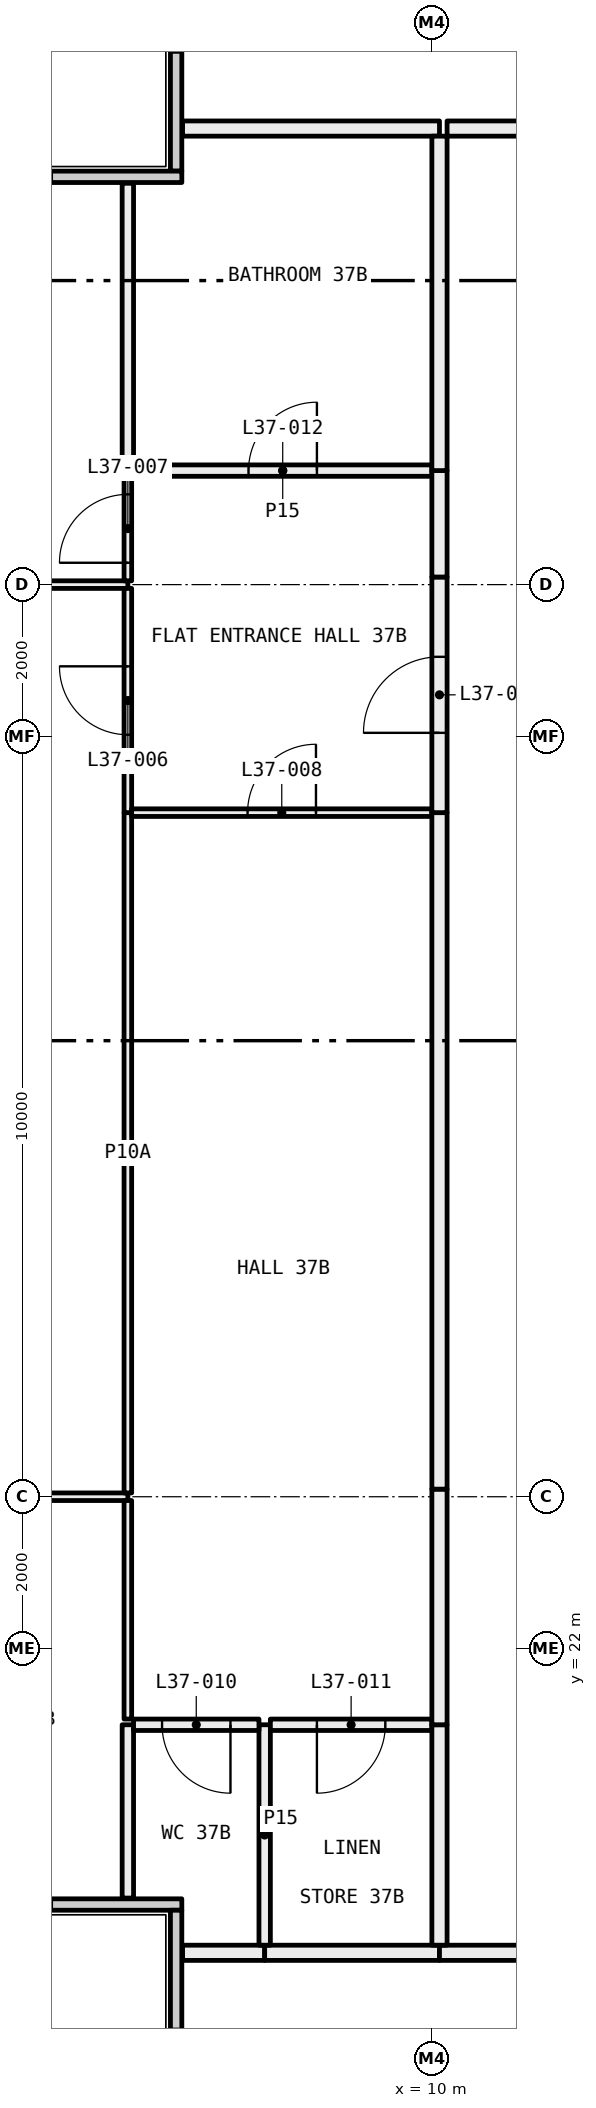
"""IFC4 building model, lengths in metres.
Left out: names, types, materials, properties, quantities, classifications, styles, units other than length and angle.
Written with IfcOpenShell. Run it as: python <this file> out.ifc"""

import sys

from ifc_helpers import new_model, si_unit, direction, frame, frame_2d, origin, place, context, subcontext, project, spatial, rectangle, extrude, element, fill, save


model = new_model("IFC4")
c1 = context("Model", 3, precision=1e-05, world=origin(), true_north=direction((0.0, 1.0)))
c2 = subcontext(c1, "Body", "Model", "MODEL_VIEW")
j1 = project(units=[si_unit("LENGTHUNIT", "METRE"), si_unit("PLANEANGLEUNIT", "RADIAN")], contexts=[c1])
p1 = place(None, origin())
s1 = spatial("IfcSite", under=j1, at=p1, CompositionType="ELEMENT")
p2 = place(p1, origin())
s2 = spatial("IfcBuilding", under=s1, at=p2, CompositionType="ELEMENT")
p3 = place(p2, frame((0.0, 0.0, 141.45)))
s3 = spatial("IfcBuildingStorey", under=s2, at=p3, CompositionType="ELEMENT", Elevation=141.45)
p4 = place(p3, frame((6.635, 41.44, 0.0), z_axis=(0.0, 0.0, 1.0), x_axis=(0.0, 1.0, 0.0)))
e1 = element("IfcWall", 1, at=p4, inside=s3, PredefinedType="ELEMENTEDWALL", context=c2, shape_type="SweptSolid", body=[
    extrude(rectangle(XDim=5.85, YDim=0.15, at=frame_2d((2.925, 0.0))), origin(), (0.0, 0.0, 1.0), 3.05),
])
p5 = place(p4, frame((1.56, 0.0, 0.45)))
e2 = element("IfcOpeningElement", 2, at=p5, cuts=e1, PredefinedType="OPENING", context=c2, shape_type="SweptSolid", body=[
    extrude(rectangle(XDim=4.0, YDim=2.55, at=frame_2d((2.0, 1.275))), frame((0.0, 0.085, 0.0), z_axis=(0.0, -1.0, 0.0), x_axis=(1.0, 0.0, 0.0)), (0.0, 0.0, 1.0), 0.17),
])
p6 = place(p3, frame((0.56, 41.365, 0.0), z_axis=(0.0, 0.0, 1.0), x_axis=(1.0, 0.0, 0.0)))
e3 = element("IfcWall", 3, at=p6, inside=s3, PredefinedType="ELEMENTEDWALL", context=c2, shape_type="SweptSolid", body=[
    extrude(rectangle(XDim=6.15, YDim=0.15, at=frame_2d((3.075, 0.0))), origin(), (0.0, 0.0, 1.0), 3.05),
])
p7 = place(p6, frame((0.44, 0.0, 0.45)))
e4 = element("IfcOpeningElement", 4, at=p7, cuts=e3, PredefinedType="OPENING", context=c2, shape_type="SweptSolid", body=[
    extrude(rectangle(XDim=4.0, YDim=2.55, at=frame_2d((2.0, 1.275))), frame((0.0, 0.085, 0.0), z_axis=(0.0, -1.0, 0.0), x_axis=(1.0, 0.0, 0.0)), (0.0, 0.0, 1.0), 0.17),
])
p8 = place(p3, frame((0.56, 18.635, 0.0), z_axis=(0.0, 0.0, 1.0), x_axis=(1.0, 0.0, 0.0)))
e5 = element("IfcWall", 5, at=p8, inside=s3, PredefinedType="ELEMENTEDWALL", context=c2, shape_type="SweptSolid", body=[
    extrude(rectangle(XDim=6.15, YDim=0.15, at=frame_2d((3.075, 0.0))), origin(), (0.0, 0.0, 1.0), 3.05),
])
p9 = place(p8, frame((0.44, 0.0, 0.45)))
e6 = element("IfcOpeningElement", 6, at=p9, cuts=e5, PredefinedType="OPENING", context=c2, shape_type="SweptSolid", body=[
    extrude(rectangle(XDim=4.0, YDim=2.55, at=frame_2d((2.0, 1.275))), frame((0.0, 0.085, 0.0), z_axis=(0.0, -1.0, 0.0), x_axis=(1.0, 0.0, 0.0)), (0.0, 0.0, 1.0), 0.17),
])
p10 = place(p3, frame((6.635, 12.71, 0.0), z_axis=(0.0, 0.0, 1.0), x_axis=(0.0, 1.0, 0.0)))
e7 = element("IfcWall", 7, at=p10, inside=s3, PredefinedType="ELEMENTEDWALL", context=c2, shape_type="SweptSolid", body=[
    extrude(rectangle(XDim=5.85, YDim=0.15, at=frame_2d((2.925, 0.0))), origin(), (0.0, 0.0, 1.0), 3.05),
])
p11 = place(p10, frame((0.29, 0.0, 0.45)))
e8 = element("IfcOpeningElement", 8, at=p11, cuts=e7, PredefinedType="OPENING", context=c2, shape_type="SweptSolid", body=[
    extrude(rectangle(XDim=4.0, YDim=2.55, at=frame_2d((2.0, 1.275))), frame((0.0, 0.085, 0.0), z_axis=(0.0, -1.0, 0.0), x_axis=(1.0, 0.0, 0.0)), (0.0, 0.0, 1.0), 0.17),
])
p12 = place(p3, frame((7.8, 18.0, 0.0), z_axis=(0.0, 0.0, 1.0), x_axis=(-1.0, 0.0, 0.0)))
e9 = element("IfcWall", 9, at=p12, inside=s3, PredefinedType="PARTITIONING", context=c2, shape_type="SweptSolid", body=[
    extrude(rectangle(XDim=1.08, YDim=0.2, at=frame_2d((0.54, 0.0))), origin(), (0.0, 0.0, 1.0), 3.05),
])
p13 = place(p3, frame((10.1, 18.0, 0.0), z_axis=(0.0, 0.0, 1.0), x_axis=(-1.0, 0.0, 0.0)))
e10 = element("IfcWall", 10, at=p13, inside=s3, PredefinedType="PARTITIONING", context=c2, shape_type="SweptSolid", body=[
    extrude(rectangle(XDim=2.3, YDim=0.2, at=frame_2d((1.15, 0.0))), origin(), (0.0, 0.0, 1.0), 3.05),
])
p14 = place(p3, frame((12.0, 18.0, 0.0), z_axis=(0.0, 0.0, 1.0), x_axis=(-1.0, 0.0, 0.0)))
e11 = element("IfcWall", 11, at=p14, inside=s3, PredefinedType="PARTITIONING", context=c2, shape_type="SweptSolid", body=[
    extrude(rectangle(XDim=1.9, YDim=0.2, at=frame_2d((0.95, 0.0))), origin(), (0.0, 0.0, 1.0), 3.05),
])
p15 = place(p3, frame((6.0, 24.0, 0.0), z_axis=(0.0, 0.0, 1.0), x_axis=(-1.0, 0.0, 0.0)))
e12 = element("IfcWall", 12, at=p15, inside=s3, PredefinedType="PARTITIONING", context=c2, shape_type="SweptSolid", body=[
    extrude(rectangle(XDim=5.28, YDim=0.1, at=frame_2d((2.64, 0.0))), origin(), (0.0, 0.0, 1.0), 2.45),
])
p16 = place(p15, frame((2.19, 0.0, 0.0)))
e13 = element("IfcOpeningElement", 13, at=p16, cuts=e12, PredefinedType="OPENING", context=c2, shape_type="SweptSolid", body=[
    extrude(rectangle(XDim=0.9, YDim=2.1, at=frame_2d((0.45, 1.05))), frame((0.0, 0.06, 0.0), z_axis=(0.0, -1.0, 0.0), x_axis=(1.0, 0.0, 0.0)), (0.0, 0.0, 1.0), 0.12),
])
p17 = place(p3, frame((6.0, 18.72, 0.0), z_axis=(0.0, 0.0, 1.0), x_axis=(0.0, 1.0, 0.0)))
e14 = element("IfcWall", 14, at=p17, inside=s3, PredefinedType="PARTITIONING", context=c2, shape_type="SweptSolid", body=[
    extrude(rectangle(XDim=2.28, YDim=0.15, at=frame_2d((1.14, 0.0))), origin(), (0.0, 0.0, 1.0), 3.05),
])
p18 = place(p3, frame((6.0, 21.075, 0.0), z_axis=(0.0, 0.0, 1.0), x_axis=(0.0, 1.0, 0.0)))
e15 = element("IfcWall", 15, at=p18, inside=s3, PredefinedType="PARTITIONING", context=c2, shape_type="SweptSolid", body=[
    extrude(rectangle(XDim=2.875, YDim=0.1, at=frame_2d((1.438, 0.0))), origin(), (0.0, 0.0, 1.0), 2.45),
])
p19 = place(p3, frame((6.0, 36.0, 0.0), z_axis=(0.0, 0.0, 1.0), x_axis=(-1.0, 0.0, 0.0)))
e16 = element("IfcWall", 16, at=p19, inside=s3, PredefinedType="PARTITIONING", context=c2, shape_type="SweptSolid", body=[
    extrude(rectangle(XDim=5.28, YDim=0.1, at=frame_2d((2.64, 0.0))), origin(), (0.0, 0.0, 1.0), 2.45),
])
p20 = place(p3, frame((6.0, 24.05, 0.0), z_axis=(0.0, 0.0, 1.0), x_axis=(0.0, 1.0, 0.0)))
e17 = element("IfcWall", 17, at=p20, inside=s3, PredefinedType="PARTITIONING", context=c2, shape_type="SweptSolid", body=[
    extrude(rectangle(XDim=8.95, YDim=0.1, at=frame_2d((4.475, 0.0))), origin(), (0.0, 0.0, 1.0), 2.45),
])
p21 = place(p3, frame((6.0, 33.0, 0.0), z_axis=(0.0, 0.0, 1.0), x_axis=(0.0, 1.0, 0.0)))
e18 = element("IfcWall", 18, at=p21, inside=s3, PredefinedType="PARTITIONING", context=c2, shape_type="SweptSolid", body=[
    extrude(rectangle(XDim=2.95, YDim=0.1, at=frame_2d((1.475, 0.0))), origin(), (0.0, 0.0, 1.0), 2.45),
])
p22 = place(p21, frame((1.025, 0.0, 0.0)))
e19 = element("IfcOpeningElement", 19, at=p22, cuts=e18, PredefinedType="OPENING", context=c2, shape_type="SweptSolid", body=[
    extrude(rectangle(XDim=0.9, YDim=2.1, at=frame_2d((0.45, 1.05))), frame((0.0, 0.06, 0.0), z_axis=(0.0, -1.0, 0.0), x_axis=(1.0, 0.0, 0.0)), (0.0, 0.0, 1.0), 0.12),
])
p23 = place(p3, frame((6.0, 36.05, 0.0), z_axis=(0.0, 0.0, 1.0), x_axis=(0.0, 1.0, 0.0)))
e20 = element("IfcWall", 20, at=p23, inside=s3, PredefinedType="PARTITIONING", context=c2, shape_type="SweptSolid", body=[
    extrude(rectangle(XDim=1.375, YDim=0.1, at=frame_2d((0.688, 0.0))), origin(), (0.0, 0.0, 1.0), 2.45),
])
p24 = place(p23, frame((0.238, 0.0, 0.0)))
e21 = element("IfcOpeningElement", 21, at=p24, cuts=e20, PredefinedType="OPENING", context=c2, shape_type="SweptSolid", body=[
    extrude(rectangle(XDim=0.9, YDim=2.1, at=frame_2d((0.45, 1.05))), frame((0.0, 0.06, 0.0), z_axis=(0.0, -1.0, 0.0), x_axis=(1.0, 0.0, 0.0)), (0.0, 0.0, 1.0), 0.12),
])
p25 = place(p3, frame((6.0, 37.5, 0.0), z_axis=(0.0, 0.0, 1.0), x_axis=(0.0, 1.0, 0.0)))
e22 = element("IfcWall", 22, at=p25, inside=s3, PredefinedType="PARTITIONING", context=c2, shape_type="SweptSolid", body=[
    extrude(rectangle(XDim=3.78, YDim=0.15, at=frame_2d((1.89, 0.0))), origin(), (0.0, 0.0, 1.0), 3.05),
])
p26 = place(p3, frame((7.8, 18.1, 0.0), z_axis=(0.0, 0.0, 1.0), x_axis=(0.0, 1.0, 0.0)))
e23 = element("IfcWall", 23, at=p26, inside=s3, PredefinedType="PARTITIONING", context=c2, shape_type="SweptSolid", body=[
    extrude(rectangle(XDim=2.9, YDim=0.15, at=frame_2d((1.45, 0.0))), origin(), (0.0, 0.0, 1.0), 3.05),
])
p27 = place(p3, frame((7.725, 21.0, 0.0), z_axis=(0.0, 0.0, 1.0), x_axis=(-1.0, 0.0, 0.0)))
e24 = element("IfcWall", 24, at=p27, inside=s3, PredefinedType="PARTITIONING", context=c2, shape_type="SweptSolid", body=[
    extrude(rectangle(XDim=1.65, YDim=0.15, at=frame_2d((0.825, 0.0))), origin(), (0.0, 0.0, 1.0), 3.05),
])
p28 = place(p27, frame((0.375, 0.0, 0.0)))
e25 = element("IfcOpeningElement", 25, at=p28, cuts=e24, PredefinedType="OPENING", context=c2, shape_type="SweptSolid", body=[
    extrude(rectangle(XDim=0.9, YDim=2.1, at=frame_2d((0.45, 1.05))), frame((0.0, 0.085, 0.0), z_axis=(0.0, -1.0, 0.0), x_axis=(1.0, 0.0, 0.0)), (0.0, 0.0, 1.0), 0.17),
])
p29 = place(p3, frame((10.0, 21.0, 0.0), z_axis=(0.0, 0.0, 1.0), x_axis=(-1.0, 0.0, 0.0)))
e26 = element("IfcWall", 26, at=p29, inside=s3, PredefinedType="PARTITIONING", context=c2, shape_type="SweptSolid", body=[
    extrude(rectangle(XDim=2.125, YDim=0.15, at=frame_2d((1.062, 0.0))), origin(), (0.0, 0.0, 1.0), 3.05),
])
p30 = place(p29, frame((0.613, 0.0, 0.0)))
e27 = element("IfcOpeningElement", 27, at=p30, cuts=e26, PredefinedType="OPENING", context=c2, shape_type="SweptSolid", body=[
    extrude(rectangle(XDim=0.9, YDim=2.1, at=frame_2d((0.45, 1.05))), frame((0.0, 0.085, 0.0), z_axis=(0.0, -1.0, 0.0), x_axis=(1.0, 0.0, 0.0)), (0.0, 0.0, 1.0), 0.17),
])
p31 = place(p3, frame((10.1, 18.1, 0.0), z_axis=(0.0, 0.0, 1.0), x_axis=(0.0, 1.0, 0.0)))
e28 = element("IfcWall", 28, at=p31, inside=s3, PredefinedType="PARTITIONING", context=c2, shape_type="SweptSolid", body=[
    extrude(rectangle(XDim=2.9, YDim=0.2, at=frame_2d((1.45, 0.0))), origin(), (0.0, 0.0, 1.0), 3.05),
])
p32 = place(p3, frame((10.0, 33.0, 0.0), z_axis=(0.0, 0.0, 1.0), x_axis=(-1.0, 0.0, 0.0)))
e29 = element("IfcWall", 29, at=p32, inside=s3, PredefinedType="PARTITIONING", context=c2, shape_type="SweptSolid", body=[
    extrude(rectangle(XDim=3.95, YDim=0.1, at=frame_2d((1.975, 0.0))), origin(), (0.0, 0.0, 1.0), 3.05),
])
p33 = place(p32, frame((1.525, 0.0, 0.0)))
e30 = element("IfcOpeningElement", 30, at=p33, cuts=e29, PredefinedType="OPENING", context=c2, shape_type="SweptSolid", body=[
    extrude(rectangle(XDim=0.9, YDim=2.1, at=frame_2d((0.45, 1.05))), frame((0.0, 0.06, 0.0), z_axis=(0.0, -1.0, 0.0), x_axis=(1.0, 0.0, 0.0)), (0.0, 0.0, 1.0), 0.12),
])
p34 = place(p3, frame((10.1, 21.0, 0.0), z_axis=(0.0, 0.0, 1.0), x_axis=(0.0, 1.0, 0.0)))
e31 = element("IfcWall", 31, at=p34, inside=s3, PredefinedType="PARTITIONING", context=c2, shape_type="SweptSolid", body=[
    extrude(rectangle(XDim=3.1, YDim=0.2, at=frame_2d((1.55, 0.0))), origin(), (0.0, 0.0, 1.0), 2.45),
])
p35 = place(p3, frame((10.1, 24.1, 0.0), z_axis=(0.0, 0.0, 1.0), x_axis=(0.0, 1.0, 0.0)))
e32 = element("IfcWall", 32, at=p35, inside=s3, PredefinedType="PARTITIONING", context=c2, shape_type="SweptSolid", body=[
    extrude(rectangle(XDim=8.9, YDim=0.2, at=frame_2d((4.45, 0.0))), origin(), (0.0, 0.0, 1.0), 3.05),
])
p36 = place(p3, frame((10.0, 37.5, 0.0), z_axis=(0.0, 0.0, 1.0), x_axis=(-1.0, 0.0, 0.0)))
e33 = element("IfcWall", 33, at=p36, inside=s3, PredefinedType="PARTITIONING", context=c2, shape_type="SweptSolid", body=[
    extrude(rectangle(XDim=3.925, YDim=0.15, at=frame_2d((1.962, 0.0))), origin(), (0.0, 0.0, 1.0), 3.05),
])
p37 = place(p36, frame((1.512, 0.0, 0.0)))
e34 = element("IfcOpeningElement", 34, at=p37, cuts=e33, PredefinedType="OPENING", context=c2, shape_type="SweptSolid", body=[
    extrude(rectangle(XDim=0.9, YDim=2.1, at=frame_2d((0.45, 1.05))), frame((0.0, 0.085, 0.0), z_axis=(0.0, -1.0, 0.0), x_axis=(1.0, 0.0, 0.0)), (0.0, 0.0, 1.0), 0.17),
])
p38 = place(p3, frame((10.1, 33.0, 0.0), z_axis=(0.0, 0.0, 1.0), x_axis=(0.0, 1.0, 0.0)))
e35 = element("IfcWall", 35, at=p38, inside=s3, PredefinedType="PARTITIONING", context=c2, shape_type="SweptSolid", body=[
    extrude(rectangle(XDim=3.1, YDim=0.2, at=frame_2d((1.55, 0.0))), origin(), (0.0, 0.0, 1.0), 2.45),
])
p39 = place(p38, frame((1.05, 0.0, 0.0)))
e36 = element("IfcOpeningElement", 36, at=p39, cuts=e35, PredefinedType="OPENING", context=c2, shape_type="SweptSolid", body=[
    extrude(rectangle(XDim=1.0, YDim=2.1, at=frame_2d((0.5, 1.05))), frame((0.0, 0.11, 0.0), z_axis=(0.0, -1.0, 0.0), x_axis=(1.0, 0.0, 0.0)), (0.0, 0.0, 1.0), 0.22),
])
p40 = place(p3, frame((10.1, 36.1, 0.0), z_axis=(0.0, 0.0, 1.0), x_axis=(0.0, 1.0, 0.0)))
e37 = element("IfcWall", 37, at=p40, inside=s3, PredefinedType="PARTITIONING", context=c2, shape_type="SweptSolid", body=[
    extrude(rectangle(XDim=1.4, YDim=0.2, at=frame_2d((0.7, 0.0))), origin(), (0.0, 0.0, 1.0), 3.05),
])
p41 = place(p3, frame((10.1, 42.0, 0.0), z_axis=(0.0, 0.0, 1.0), x_axis=(-1.0, 0.0, 0.0)))
e38 = element("IfcWall", 38, at=p41, inside=s3, PredefinedType="PARTITIONING", context=c2, shape_type="SweptSolid", body=[
    extrude(rectangle(XDim=3.38, YDim=0.2, at=frame_2d((1.69, 0.0))), origin(), (0.0, 0.0, 1.0), 3.05),
])
p42 = place(p3, frame((10.1, 37.5, 0.0), z_axis=(0.0, 0.0, 1.0), x_axis=(0.0, 1.0, 0.0)))
e39 = element("IfcWall", 39, at=p42, inside=s3, PredefinedType="PARTITIONING", context=c2, shape_type="SweptSolid", body=[
    extrude(rectangle(XDim=4.4, YDim=0.2, at=frame_2d((2.2, 0.0))), origin(), (0.0, 0.0, 1.0), 3.05),
])
p43 = place(p3, frame((10.2, 42.0, 0.0), z_axis=(0.0, 0.0, 1.0), x_axis=(1.0, 0.0, 0.0)))
e40 = element("IfcWall", 40, at=p43, inside=s3, PredefinedType="PARTITIONING", context=c2, shape_type="SweptSolid", body=[
    extrude(rectangle(XDim=1.8, YDim=0.2, at=frame_2d((0.9, 0.0))), origin(), (0.0, 0.0, 1.0), 3.05),
])
p44 = place(p39, origin())
e41 = element("IfcDoor", 41, at=p44, inside=s3, OperationType="SINGLE_SWING_RIGHT", PredefinedType="DOOR", context=c2, shape_type="SweptSolid", body=[
    extrude(rectangle(XDim=1.0, YDim=2.1, at=frame_2d((0.5, 1.05))), frame((0.0, 0.025, 0.0), z_axis=(0.0, -1.0, 0.0), x_axis=(1.0, 0.0, 0.0)), (0.0, 0.0, 1.0), 0.05),
])
fill(e36, e41)
p45 = place(p22, origin())
e42 = element("IfcDoor", 42, at=p45, inside=s3, OperationType="SINGLE_SWING_LEFT", PredefinedType="DOOR", context=c2, shape_type="SweptSolid", body=[
    extrude(rectangle(XDim=0.9, YDim=2.1, at=frame_2d((0.45, 1.05))), frame((0.0, 0.025, 0.0), z_axis=(0.0, -1.0, 0.0), x_axis=(1.0, 0.0, 0.0)), (0.0, 0.0, 1.0), 0.05),
])
fill(e19, e42)
p46 = place(p24, origin())
e43 = element("IfcDoor", 43, at=p46, inside=s3, OperationType="SINGLE_SWING_RIGHT", PredefinedType="DOOR", context=c2, shape_type="SweptSolid", body=[
    extrude(rectangle(XDim=0.9, YDim=2.1, at=frame_2d((0.45, 1.05))), frame((0.0, 0.025, 0.0), z_axis=(0.0, -1.0, 0.0), x_axis=(1.0, 0.0, 0.0)), (0.0, 0.0, 1.0), 0.05),
])
fill(e21, e43)
p47 = place(p33, frame((0.9, 0.0, 0.0), x_axis=(-1.0, 0.0, 0.0)))
e44 = element("IfcDoor", 44, at=p47, inside=s3, OperationType="SINGLE_SWING_LEFT", PredefinedType="DOOR", context=c2, shape_type="SweptSolid", body=[
    extrude(rectangle(XDim=0.9, YDim=2.1, at=frame_2d((0.45, 1.05))), frame((0.0, 0.025, 0.0), z_axis=(0.0, -1.0, 0.0), x_axis=(1.0, 0.0, 0.0)), (0.0, 0.0, 1.0), 0.05),
])
fill(e30, e44)
p48 = place(p28, origin())
e45 = element("IfcDoor", 45, at=p48, inside=s3, OperationType="SINGLE_SWING_RIGHT", PredefinedType="DOOR", context=c2, shape_type="SweptSolid", body=[
    extrude(rectangle(XDim=0.9, YDim=2.1, at=frame_2d((0.45, 1.05))), frame((0.0, 0.025, 0.0), z_axis=(0.0, -1.0, 0.0), x_axis=(1.0, 0.0, 0.0)), (0.0, 0.0, 1.0), 0.05),
])
fill(e25, e45)
p49 = place(p30, origin())
e46 = element("IfcDoor", 46, at=p49, inside=s3, OperationType="SINGLE_SWING_LEFT", PredefinedType="DOOR", context=c2, shape_type="SweptSolid", body=[
    extrude(rectangle(XDim=0.9, YDim=2.1, at=frame_2d((0.45, 1.05))), frame((0.0, 0.025, 0.0), z_axis=(0.0, -1.0, 0.0), x_axis=(1.0, 0.0, 0.0)), (0.0, 0.0, 1.0), 0.05),
])
fill(e27, e46)
p50 = place(p37, frame((0.9, 0.0, 0.0), x_axis=(-1.0, 0.0, 0.0)))
e47 = element("IfcDoor", 47, at=p50, inside=s3, OperationType="SINGLE_SWING_LEFT", PredefinedType="DOOR", context=c2, shape_type="SweptSolid", body=[
    extrude(rectangle(XDim=0.9, YDim=2.1, at=frame_2d((0.45, 1.05))), frame((0.0, 0.025, 0.0), z_axis=(0.0, -1.0, 0.0), x_axis=(1.0, 0.0, 0.0)), (0.0, 0.0, 1.0), 0.05),
])
fill(e34, e47)
save(model, sys.argv[1])
